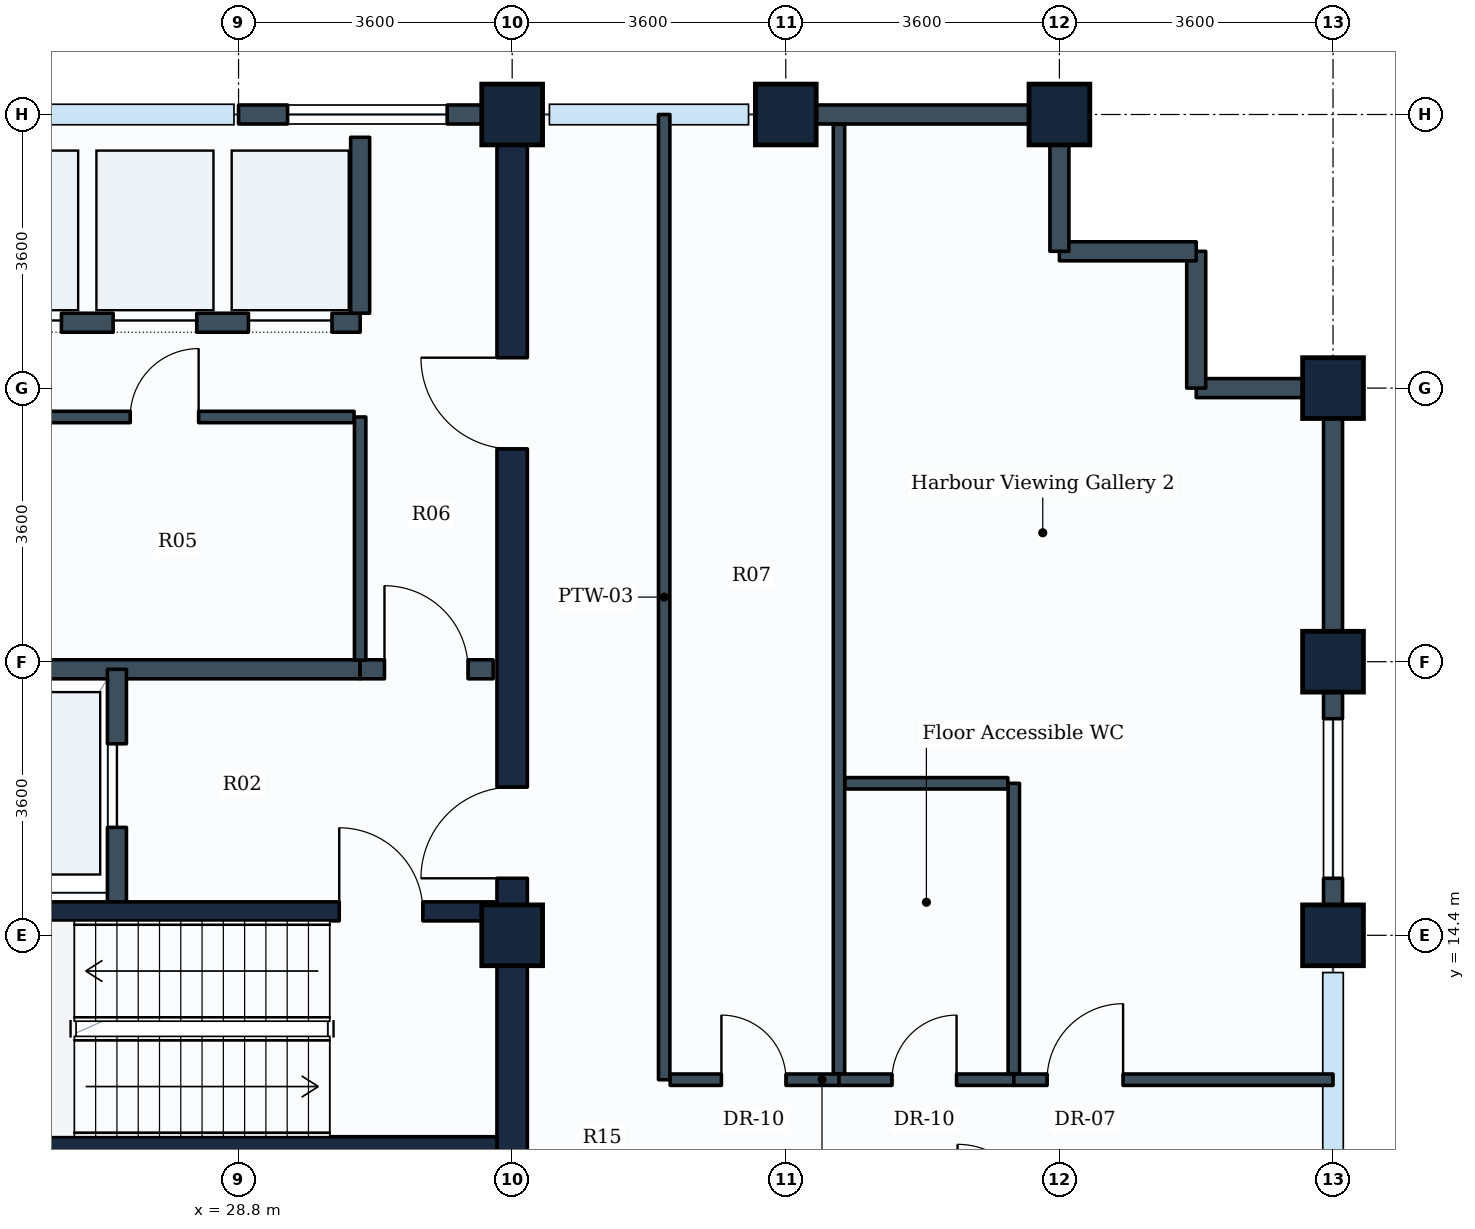
"""IFC4 building model, lengths in metres.
Left out: names, types, materials, properties, quantities, classifications, styles, units other than length and angle.
Written with IfcOpenShell. Run it as: python <this file> out.ifc"""

import sys

from ifc_helpers import new_model, si_unit, direction, frame, frame_2d, origin, origin_2d, place, context, subcontext, project, spatial, rectangle, extrude, element, fill, save


model = new_model("IFC4")
c1 = context("Model", 3, precision=1e-05, world=origin(), true_north=direction((0.0, 1.0)))
c2 = subcontext(c1, "Body", "Model", "MODEL_VIEW")
j1 = project(units=[si_unit("LENGTHUNIT", "METRE"), si_unit("PLANEANGLEUNIT", "RADIAN")], contexts=[c1])
p1 = place(None, origin())
s1 = spatial("IfcSite", under=j1, at=p1, CompositionType="ELEMENT")
p2 = place(p1, origin())
s2 = spatial("IfcBuilding", under=s1, at=p2, CompositionType="ELEMENT")
p3 = place(p2, frame((0.0, 0.0, 299.8)))
s3 = spatial("IfcBuildingStorey", under=s2, at=p3, CompositionType="ELEMENT", Elevation=299.8)
for number, where, z_axis, x_axis in (
    (1, (32.4, 14.4, 0.0), (0.0, 0.0, 1.0), (1.0, 0.0, 0.0)),
    (2, (32.4, 25.2, 0.0), (0.0, 0.0, 1.0), (1.0, 0.0, 0.0)),
    (3, (36.0, 25.2, 0.0), (0.0, 0.0, 1.0), (1.0, 0.0, 0.0)),
    (4, (39.6, 25.2, 0.0), (0.0, 0.0, 1.0), (1.0, 0.0, 0.0)),
    (5, (43.2, 14.4, 0.0), (0.0, 0.0, 1.0), (0.0, 1.0, 0.0)),
    (6, (43.2, 18.0, 0.0), (0.0, 0.0, 1.0), (0.0, 1.0, 0.0)),
    (7, (43.2, 21.6, 0.0), (0.0, 0.0, 1.0), (0.0, 1.0, 0.0)),
):
    element("IfcColumn", number, at=place(p3, frame(where, z_axis=z_axis, x_axis=x_axis)), inside=s3, PredefinedType="COLUMN", context=c2, shape_type="SweptSolid", body=[
        extrude(rectangle(XDim=0.8, YDim=0.8, at=origin_2d()), origin(), (0.0, 0.0, 1.0), 4.4),
    ])
p4 = place(p3, frame((43.2, 18.0, 0.0), z_axis=(0.0, 0.0, 1.0), x_axis=(0.0, -1.0, 0.0)))
e8 = element("IfcWall", 8, at=p4, inside=s3, PredefinedType="STANDARD", context=c2, shape_type="SweptSolid", body=[
    extrude(rectangle(XDim=3.6, YDim=0.25, at=frame_2d((1.8, 0.0))), origin(), (0.0, 0.0, 1.0), 2.58),
])
p5 = place(p4, frame((0.75, 0.0, 0.85)))
e9 = element("IfcOpeningElement", 9, at=p5, cuts=e8, PredefinedType="OPENING", context=c2, shape_type="SweptSolid", body=[
    extrude(rectangle(XDim=2.1, YDim=1.35, at=frame_2d((1.05, 0.675))), frame((0.0, 0.135, 0.0), z_axis=(0.0, -1.0, 0.0), x_axis=(1.0, 0.0, 0.0)), (0.0, 0.0, 1.0), 0.27),
])
p6 = place(p3, frame((43.2, 21.6, 0.0), z_axis=(0.0, 0.0, 1.0), x_axis=(0.0, -1.0, 0.0)))
e10 = element("IfcWall", 10, at=p6, inside=s3, PredefinedType="STANDARD", context=c2, shape_type="SweptSolid", body=[
    extrude(rectangle(XDim=3.6, YDim=0.25, at=frame_2d((1.8, 0.0))), origin(), (0.0, 0.0, 1.0), 2.58),
])
p7 = place(p3, frame((41.4, 21.6, 0.0), z_axis=(0.0, 0.0, 1.0), x_axis=(1.0, 0.0, 0.0)))
e11 = element("IfcWall", 11, at=p7, inside=s3, PredefinedType="STANDARD", context=c2, shape_type="SweptSolid", body=[
    extrude(rectangle(XDim=1.8, YDim=0.25, at=frame_2d((0.9, 0.0))), origin(), (0.0, 0.0, 1.0), 2.58),
])
for number, where, z_axis, x_axis in (
    (12, (41.4, 23.4, 0.0), (0.0, 0.0, 1.0), (0.0, -1.0, 0.0)),
    (13, (39.6, 23.4, 0.0), (0.0, 0.0, 1.0), (1.0, 0.0, 0.0)),
):
    element("IfcWall", number, at=place(p3, frame(where, z_axis=z_axis, x_axis=x_axis)), inside=s3, PredefinedType="STANDARD", context=c2, shape_type="SweptSolid", body=[
        extrude(rectangle(XDim=1.8, YDim=0.25, at=frame_2d((0.9, 0.0))), origin(), (0.0, 0.0, 1.0), 2.58),
    ])
p8 = place(p3, frame((39.6, 25.2, 0.0), z_axis=(0.0, 0.0, 1.0), x_axis=(0.0, -1.0, 0.0)))
e14 = element("IfcWall", 14, at=p8, inside=s3, PredefinedType="STANDARD", context=c2, shape_type="SweptSolid", body=[
    extrude(rectangle(XDim=1.8, YDim=0.25, at=frame_2d((0.9, 0.0))), origin(), (0.0, 0.0, 1.0), 2.58),
])
p9 = place(p3, frame((36.0, 25.2, 0.0), z_axis=(0.0, 0.0, 1.0), x_axis=(1.0, 0.0, 0.0)))
e15 = element("IfcWall", 15, at=p9, inside=s3, PredefinedType="STANDARD", context=c2, shape_type="SweptSolid", body=[
    extrude(rectangle(XDim=3.6, YDim=0.25, at=frame_2d((1.8, 0.0))), origin(), (0.0, 0.0, 1.0), 2.58),
])
p10 = place(p3, frame((28.8, 25.2, 0.0), z_axis=(0.0, 0.0, 1.0), x_axis=(1.0, 0.0, 0.0)))
e16 = element("IfcWall", 16, at=p10, inside=s3, PredefinedType="STANDARD", context=c2, shape_type="SweptSolid", body=[
    extrude(rectangle(XDim=3.6, YDim=0.25, at=frame_2d((1.8, 0.0))), origin(), (0.0, 0.0, 1.0), 4.135),
])
p11 = place(p10, frame((0.645, 0.0, 0.85)))
e17 = element("IfcOpeningElement", 17, at=p11, cuts=e16, PredefinedType="OPENING", context=c2, shape_type="SweptSolid", body=[
    extrude(rectangle(XDim=2.1, YDim=1.35, at=frame_2d((1.05, 0.675))), frame((0.0, 0.135, 0.0), z_axis=(0.0, -1.0, 0.0), x_axis=(1.0, 0.0, 0.0)), (0.0, 0.0, 1.0), 0.27),
])
p12 = place(p3, frame((32.4, 10.8, 0.0), z_axis=(0.0, 0.0, 1.0), x_axis=(0.0, 1.0, 0.0)))
e18 = element("IfcWall", 18, at=p12, inside=s3, PredefinedType="SHEAR", context=c2, shape_type="SweptSolid", body=[
    extrude(rectangle(XDim=14.4, YDim=0.4, at=frame_2d((7.2, 0.0))), origin(), (0.0, 0.0, 1.0), 4.15),
])
p13 = place(p12, frame((4.35, 0.0, 0.0)))
e19 = element("IfcOpeningElement", 19, at=p13, cuts=e18, PredefinedType="OPENING", context=c2, shape_type="SweptSolid", body=[
    extrude(rectangle(XDim=1.2, YDim=2.1, at=frame_2d((0.6, 1.05))), frame((0.0, 0.21, 0.0), z_axis=(0.0, -1.0, 0.0), x_axis=(1.0, 0.0, 0.0)), (0.0, 0.0, 1.0), 0.42),
])
p14 = place(p12, frame((10.0, 0.0, 0.0)))
e20 = element("IfcOpeningElement", 20, at=p14, cuts=e18, PredefinedType="OPENING", context=c2, shape_type="SweptSolid", body=[
    extrude(rectangle(XDim=1.2, YDim=2.1, at=frame_2d((0.6, 1.05))), frame((0.0, 0.21, 0.0), z_axis=(0.0, -1.0, 0.0), x_axis=(1.0, 0.0, 0.0)), (0.0, 0.0, 1.0), 0.42),
])
p15 = place(p3, frame((23.35, 11.625, 0.0), z_axis=(0.0, 0.0, 1.0), x_axis=(1.0, 0.0, 0.0)))
e21 = element("IfcWall", 21, at=p15, inside=s3, PredefinedType="SHEAR", context=c2, shape_type="SweptSolid", body=[
    extrude(rectangle(XDim=8.85, YDim=0.25, at=frame_2d((4.425, 0.0))), origin(), (0.0, 0.0, 1.0), 4.15),
])
p16 = place(p3, frame((23.35, 14.715, 0.0), z_axis=(0.0, 0.0, 1.0), x_axis=(1.0, 0.0, 0.0)))
e22 = element("IfcWall", 22, at=p16, inside=s3, PredefinedType="SHEAR", context=c2, shape_type="SweptSolid", body=[
    extrude(rectangle(XDim=8.85, YDim=0.25, at=frame_2d((4.425, 0.0))), origin(), (0.0, 0.0, 1.0), 4.15),
])
p17 = place(p16, frame((6.775, 0.0, 0.0)))
e23 = element("IfcOpeningElement", 23, at=p17, cuts=e22, PredefinedType="OPENING", context=c2, shape_type="SweptSolid", body=[
    extrude(rectangle(XDim=1.1, YDim=2.1, at=frame_2d((0.55, 1.05))), frame((0.0, 0.135, 0.0), z_axis=(0.0, -1.0, 0.0), x_axis=(1.0, 0.0, 0.0)), (0.0, 0.0, 1.0), 0.27),
])
p18 = place(p3, frame((21.88, 17.9, 0.0), z_axis=(0.0, 0.0, 1.0), x_axis=(1.0, 0.0, 0.0)))
e24 = element("IfcWall", 24, at=p18, inside=s3, PredefinedType="PARTITIONING", context=c2, shape_type="SweptSolid", body=[
    extrude(rectangle(XDim=8.52, YDim=0.25, at=frame_2d((4.26, 0.0))), origin(), (0.0, 0.0, 1.0), 4.135),
])
p19 = place(p3, frame((30.4, 17.9, 0.0), z_axis=(0.0, 0.0, 1.0), x_axis=(1.0, 0.0, 0.0)))
e25 = element("IfcWall", 25, at=p19, inside=s3, PredefinedType="PARTITIONING", context=c2, shape_type="SweptSolid", body=[
    extrude(rectangle(XDim=1.75, YDim=0.25, at=frame_2d((0.875, 0.0))), origin(), (0.0, 0.0, 1.0), 4.135),
])
p20 = place(p19, frame((0.32, 0.0, 0.0)))
e26 = element("IfcOpeningElement", 26, at=p20, cuts=e25, PredefinedType="OPENING", context=c2, shape_type="SweptSolid", body=[
    extrude(rectangle(XDim=1.1, YDim=2.1, at=frame_2d((0.55, 1.05))), frame((0.0, 0.135, 0.0), z_axis=(0.0, -1.0, 0.0), x_axis=(1.0, 0.0, 0.0)), (0.0, 0.0, 1.0), 0.27),
])
p21 = place(p3, frame((27.2, 14.84, 0.0), z_axis=(0.0, 0.0, 1.0), x_axis=(0.0, 1.0, 0.0)))
e27 = element("IfcWall", 27, at=p21, inside=s3, PredefinedType="PARTITIONING", context=c2, shape_type="SweptSolid", body=[
    extrude(rectangle(XDim=3.06, YDim=0.25, at=frame_2d((1.53, 0.0))), origin(), (0.0, 0.0, 1.0), 4.135),
])
p22 = place(p21, frame((0.98, 0.0, 0.0)))
e28 = element("IfcOpeningElement", 28, at=p22, cuts=e27, PredefinedType="OPENING", context=c2, shape_type="SweptSolid", body=[
    extrude(rectangle(XDim=1.1, YDim=2.1, at=frame_2d((0.55, 1.05))), frame((0.0, 0.135, 0.0), z_axis=(0.0, -1.0, 0.0), x_axis=(1.0, 0.0, 0.0)), (0.0, 0.0, 1.0), 0.27),
])
p23 = place(p3, frame((23.18, 22.46, 0.0), z_axis=(0.0, 0.0, 1.0), x_axis=(1.0, 0.0, 0.0)))
e29 = element("IfcWall", 29, at=p23, inside=s3, PredefinedType="PARTITIONING", context=c2, shape_type="SweptSolid", body=[
    extrude(rectangle(XDim=7.22, YDim=0.25, at=frame_2d((3.61, 0.0))), origin(), (0.0, 0.0, 1.0), 4.135),
])
p24 = place(p23, frame((0.41, 0.0, 0.0)))
e30 = element("IfcOpeningElement", 30, at=p24, cuts=e29, PredefinedType="OPENING", context=c2, shape_type="SweptSolid", body=[
    extrude(rectangle(XDim=1.1, YDim=2.1, at=frame_2d((0.55, 1.05))), frame((0.0, 0.135, 0.0), z_axis=(0.0, -1.0, 0.0), x_axis=(1.0, 0.0, 0.0)), (0.0, 0.0, 1.0), 0.27),
])
p25 = place(p23, frame((2.19, 0.0, 0.0)))
e31 = element("IfcOpeningElement", 31, at=p25, cuts=e29, PredefinedType="OPENING", context=c2, shape_type="SweptSolid", body=[
    extrude(rectangle(XDim=1.1, YDim=2.1, at=frame_2d((0.55, 1.05))), frame((0.0, 0.135, 0.0), z_axis=(0.0, -1.0, 0.0), x_axis=(1.0, 0.0, 0.0)), (0.0, 0.0, 1.0), 0.27),
])
p26 = place(p23, frame((3.97, 0.0, 0.0)))
e32 = element("IfcOpeningElement", 32, at=p26, cuts=e29, PredefinedType="OPENING", context=c2, shape_type="SweptSolid", body=[
    extrude(rectangle(XDim=1.1, YDim=2.1, at=frame_2d((0.55, 1.05))), frame((0.0, 0.135, 0.0), z_axis=(0.0, -1.0, 0.0), x_axis=(1.0, 0.0, 0.0)), (0.0, 0.0, 1.0), 0.27),
])
p27 = place(p23, frame((5.75, 0.0, 0.0)))
e33 = element("IfcOpeningElement", 33, at=p27, cuts=e29, PredefinedType="OPENING", context=c2, shape_type="SweptSolid", body=[
    extrude(rectangle(XDim=1.1, YDim=2.1, at=frame_2d((0.55, 1.05))), frame((0.0, 0.135, 0.0), z_axis=(0.0, -1.0, 0.0), x_axis=(1.0, 0.0, 0.0)), (0.0, 0.0, 1.0), 0.27),
])
p28 = place(p3, frame((30.4, 22.585, 0.0), z_axis=(0.0, 0.0, 1.0), x_axis=(0.0, 1.0, 0.0)))
e34 = element("IfcWall", 34, at=p28, inside=s3, PredefinedType="PARTITIONING", context=c2, shape_type="SweptSolid", body=[
    extrude(rectangle(XDim=2.315, YDim=0.25, at=frame_2d((1.157, 0.0))), origin(), (0.0, 0.0, 1.0), 4.135),
])
p29 = place(p3, frame((22.775, 21.22, 0.0), z_axis=(0.0, 0.0, 1.0), x_axis=(1.0, 0.0, 0.0)))
e35 = element("IfcWall", 35, at=p29, inside=s3, PredefinedType="PARTITIONING", context=c2, shape_type="SweptSolid", body=[
    extrude(rectangle(XDim=7.545, YDim=0.15, at=frame_2d((3.772, 0.0))), origin(), (0.0, 0.0, 1.0), 4.135),
])
p30 = place(p29, frame((0.95, 0.0, 0.0)))
e36 = element("IfcOpeningElement", 36, at=p30, cuts=e35, PredefinedType="OPENING", context=c2, shape_type="SweptSolid", body=[
    extrude(rectangle(XDim=0.85, YDim=2.1, at=frame_2d((0.425, 1.05))), frame((0.0, 0.085, 0.0), z_axis=(0.0, -1.0, 0.0), x_axis=(1.0, 0.0, 0.0)), (0.0, 0.0, 1.0), 0.17),
])
p31 = place(p29, frame((4.6, 0.0, 0.0)))
e37 = element("IfcOpeningElement", 37, at=p31, cuts=e35, PredefinedType="OPENING", context=c2, shape_type="SweptSolid", body=[
    extrude(rectangle(XDim=0.9, YDim=2.1, at=frame_2d((0.45, 1.05))), frame((0.0, 0.085, 0.0), z_axis=(0.0, -1.0, 0.0), x_axis=(1.0, 0.0, 0.0)), (0.0, 0.0, 1.0), 0.17),
])
p32 = place(p3, frame((30.4, 18.02, 0.0), z_axis=(0.0, 0.0, 1.0), x_axis=(0.0, 1.0, 0.0)))
e38 = element("IfcWall", 38, at=p32, inside=s3, PredefinedType="PARTITIONING", context=c2, shape_type="SweptSolid", body=[
    extrude(rectangle(XDim=3.2, YDim=0.15, at=frame_2d((1.6, 0.0))), origin(), (0.0, 0.0, 1.0), 4.135),
])
p33 = place(p3, frame((34.4, 12.5, 0.0), z_axis=(0.0, 0.0, 1.0), x_axis=(0.0, 1.0, 0.0)))
e39 = element("IfcWall", 39, at=p33, inside=s3, PredefinedType="PARTITIONING", context=c2, shape_type="SweptSolid", body=[
    extrude(rectangle(XDim=12.7, YDim=0.15, at=frame_2d((6.35, 0.0))), origin(), (0.0, 0.0, 1.0), 2.58),
])
p34 = place(p3, frame((34.479, 12.5, 0.0), z_axis=(0.0, 0.0, 1.0), x_axis=(1.0, 0.0, 0.0)))
e40 = element("IfcWall", 40, at=p34, inside=s3, PredefinedType="PARTITIONING", context=c2, shape_type="SweptSolid", body=[
    extrude(rectangle(XDim=2.221, YDim=0.15, at=frame_2d((1.11, 0.0))), origin(), (0.0, 0.0, 1.0), 4.135),
])
p35 = place(p34, frame((0.674, 0.0, 0.0)))
e41 = element("IfcOpeningElement", 41, at=p35, cuts=e40, PredefinedType="OPENING", context=c2, shape_type="SweptSolid", body=[
    extrude(rectangle(XDim=0.85, YDim=2.1, at=frame_2d((0.425, 1.05))), frame((0.0, 0.085, 0.0), z_axis=(0.0, -1.0, 0.0), x_axis=(1.0, 0.0, 0.0)), (0.0, 0.0, 1.0), 0.17),
])
p36 = place(p3, frame((36.7, 12.579, 0.0), z_axis=(0.0, 0.0, 1.0), x_axis=(0.0, 1.0, 0.0)))
e42 = element("IfcWall", 42, at=p36, inside=s3, PredefinedType="PARTITIONING", context=c2, shape_type="SweptSolid", body=[
    extrude(rectangle(XDim=12.492, YDim=0.15, at=frame_2d((6.246, 0.0))), origin(), (0.0, 0.0, 1.0), 2.58),
])
p37 = place(p3, frame((36.7, 12.5, 0.0), z_axis=(0.0, 0.0, 1.0), x_axis=(1.0, 0.0, 0.0)))
e43 = element("IfcWall", 43, at=p37, inside=s3, PredefinedType="PARTITIONING", context=c2, shape_type="SweptSolid", body=[
    extrude(rectangle(XDim=2.3, YDim=0.15, at=frame_2d((1.15, 0.0))), origin(), (0.0, 0.0, 1.0), 4.135),
])
p38 = place(p37, frame((0.697, 0.0, 0.0)))
e44 = element("IfcOpeningElement", 44, at=p38, cuts=e43, PredefinedType="OPENING", context=c2, shape_type="SweptSolid", body=[
    extrude(rectangle(XDim=0.85, YDim=2.1, at=frame_2d((0.425, 1.05))), frame((0.0, 0.085, 0.0), z_axis=(0.0, -1.0, 0.0), x_axis=(1.0, 0.0, 0.0)), (0.0, 0.0, 1.0), 0.17),
])
p39 = place(p3, frame((39.0, 12.579, 0.0), z_axis=(0.0, 0.0, 1.0), x_axis=(0.0, 1.0, 0.0)))
e45 = element("IfcWall", 45, at=p39, inside=s3, PredefinedType="PARTITIONING", context=c2, shape_type="SweptSolid", body=[
    extrude(rectangle(XDim=3.821, YDim=0.15, at=frame_2d((1.91, 0.0))), origin(), (0.0, 0.0, 1.0), 2.58),
])
p40 = place(p3, frame((36.779, 16.4, 0.0), z_axis=(0.0, 0.0, 1.0), x_axis=(1.0, 0.0, 0.0)))
e46 = element("IfcWall", 46, at=p40, inside=s3, PredefinedType="PARTITIONING", context=c2, shape_type="SweptSolid", body=[
    extrude(rectangle(XDim=2.142, YDim=0.15, at=frame_2d((1.071, 0.0))), origin(), (0.0, 0.0, 1.0), 4.135),
])
p41 = place(p3, frame((39.0, 12.5, 0.0), z_axis=(0.0, 0.0, 1.0), x_axis=(1.0, 0.0, 0.0)))
e47 = element("IfcWall", 47, at=p41, inside=s3, PredefinedType="PARTITIONING", context=c2, shape_type="SweptSolid", body=[
    extrude(rectangle(XDim=4.2, YDim=0.15, at=frame_2d((2.1, 0.0))), origin(), (0.0, 0.0, 1.0), 2.58),
])
p42 = place(p41, frame((0.438, 0.0, 0.0)))
e48 = element("IfcOpeningElement", 48, at=p42, cuts=e47, PredefinedType="OPENING", context=c2, shape_type="SweptSolid", body=[
    extrude(rectangle(XDim=1.0, YDim=2.1, at=frame_2d((0.5, 1.05))), frame((0.0, 0.085, 0.0), z_axis=(0.0, -1.0, 0.0), x_axis=(1.0, 0.0, 0.0)), (0.0, 0.0, 1.0), 0.17),
])
p43 = place(p5, origin())
e49 = element("IfcWindow", 49, at=p43, inside=s3, PartitioningType="SINGLE_PANEL", PredefinedType="WINDOW", context=c2, shape_type="SweptSolid", body=[
    extrude(rectangle(XDim=2.1, YDim=1.35, at=frame_2d((1.05, 0.675))), frame((0.0, 0.03, 0.0), z_axis=(0.0, -1.0, 0.0), x_axis=(1.0, 0.0, 0.0)), (0.0, 0.0, 1.0), 0.06),
])
fill(e9, e49)
p44 = place(p11, origin())
e50 = element("IfcWindow", 50, at=p44, inside=s3, PartitioningType="SINGLE_PANEL", PredefinedType="WINDOW", context=c2, shape_type="SweptSolid", body=[
    extrude(rectangle(XDim=2.1, YDim=1.35, at=frame_2d((1.05, 0.675))), frame((0.0, 0.03, 0.0), z_axis=(0.0, -1.0, 0.0), x_axis=(1.0, 0.0, 0.0)), (0.0, 0.0, 1.0), 0.06),
])
fill(e17, e50)
p45 = place(p17, origin())
e51 = element("IfcDoor", 51, at=p45, inside=s3, OperationType="SINGLE_SWING_LEFT", PredefinedType="DOOR", context=c2, shape_type="SweptSolid", body=[
    extrude(rectangle(XDim=1.1, YDim=2.1, at=frame_2d((0.55, 1.05))), frame((0.0, 0.025, 0.0), z_axis=(0.0, -1.0, 0.0), x_axis=(1.0, 0.0, 0.0)), (0.0, 0.0, 1.0), 0.05),
])
fill(e23, e51)
p46 = place(p22, origin())
e52 = element("IfcDoor", 52, at=p46, inside=s3, OperationType="SLIDING_TO_LEFT", PredefinedType="DOOR", context=c2, shape_type="SweptSolid", body=[
    extrude(rectangle(XDim=1.1, YDim=2.1, at=frame_2d((0.55, 1.05))), frame((0.0, 0.025, 0.0), z_axis=(0.0, -1.0, 0.0), x_axis=(1.0, 0.0, 0.0)), (0.0, 0.0, 1.0), 0.05),
])
fill(e28, e52)
p47 = place(p13, origin())
e53 = element("IfcDoor", 53, at=p47, inside=s3, OperationType="SINGLE_SWING_LEFT", PredefinedType="DOOR", context=c2, shape_type="SweptSolid", body=[
    extrude(rectangle(XDim=1.2, YDim=2.1, at=frame_2d((0.6, 1.05))), frame((0.0, 0.025, 0.0), z_axis=(0.0, -1.0, 0.0), x_axis=(1.0, 0.0, 0.0)), (0.0, 0.0, 1.0), 0.05),
])
fill(e19, e53)
p48 = place(p20, origin())
e54 = element("IfcDoor", 54, at=p48, inside=s3, OperationType="SINGLE_SWING_LEFT", PredefinedType="DOOR", context=c2, shape_type="SweptSolid", body=[
    extrude(rectangle(XDim=1.1, YDim=2.1, at=frame_2d((0.55, 1.05))), frame((0.0, 0.025, 0.0), z_axis=(0.0, -1.0, 0.0), x_axis=(1.0, 0.0, 0.0)), (0.0, 0.0, 1.0), 0.05),
])
fill(e26, e54)
p49 = place(p25, origin())
e55 = element("IfcDoor", 55, at=p49, inside=s3, OperationType="SLIDING_TO_LEFT", PredefinedType="DOOR", context=c2, shape_type="SweptSolid", body=[
    extrude(rectangle(XDim=1.1, YDim=2.1, at=frame_2d((0.55, 1.05))), frame((0.0, 0.025, 0.0), z_axis=(0.0, -1.0, 0.0), x_axis=(1.0, 0.0, 0.0)), (0.0, 0.0, 1.0), 0.05),
])
fill(e31, e55)
p50 = place(p26, origin())
e56 = element("IfcDoor", 56, at=p50, inside=s3, OperationType="SLIDING_TO_LEFT", PredefinedType="DOOR", context=c2, shape_type="SweptSolid", body=[
    extrude(rectangle(XDim=1.1, YDim=2.1, at=frame_2d((0.55, 1.05))), frame((0.0, 0.025, 0.0), z_axis=(0.0, -1.0, 0.0), x_axis=(1.0, 0.0, 0.0)), (0.0, 0.0, 1.0), 0.05),
])
fill(e32, e56)
p51 = place(p27, origin())
e57 = element("IfcDoor", 57, at=p51, inside=s3, OperationType="SLIDING_TO_LEFT", PredefinedType="DOOR", context=c2, shape_type="SweptSolid", body=[
    extrude(rectangle(XDim=1.1, YDim=2.1, at=frame_2d((0.55, 1.05))), frame((0.0, 0.025, 0.0), z_axis=(0.0, -1.0, 0.0), x_axis=(1.0, 0.0, 0.0)), (0.0, 0.0, 1.0), 0.05),
])
fill(e33, e57)
p52 = place(p14, origin())
e58 = element("IfcDoor", 58, at=p52, inside=s3, OperationType="SINGLE_SWING_RIGHT", PredefinedType="DOOR", context=c2, shape_type="SweptSolid", body=[
    extrude(rectangle(XDim=1.2, YDim=2.1, at=frame_2d((0.6, 1.05))), frame((0.0, 0.025, 0.0), z_axis=(0.0, -1.0, 0.0), x_axis=(1.0, 0.0, 0.0)), (0.0, 0.0, 1.0), 0.05),
])
fill(e20, e58)
p53 = place(p31, origin())
e59 = element("IfcDoor", 59, at=p53, inside=s3, OperationType="SINGLE_SWING_RIGHT", PredefinedType="DOOR", context=c2, shape_type="SweptSolid", body=[
    extrude(rectangle(XDim=0.9, YDim=2.1, at=frame_2d((0.45, 1.05))), frame((0.0, 0.025, 0.0), z_axis=(0.0, -1.0, 0.0), x_axis=(1.0, 0.0, 0.0)), (0.0, 0.0, 1.0), 0.05),
])
fill(e37, e59)
p54 = place(p35, origin())
e60 = element("IfcDoor", 60, at=p54, inside=s3, OperationType="SINGLE_SWING_LEFT", PredefinedType="DOOR", context=c2, shape_type="SweptSolid", body=[
    extrude(rectangle(XDim=0.85, YDim=2.1, at=frame_2d((0.425, 1.05))), frame((0.0, 0.025, 0.0), z_axis=(0.0, -1.0, 0.0), x_axis=(1.0, 0.0, 0.0)), (0.0, 0.0, 1.0), 0.05),
])
fill(e41, e60)
p55 = place(p38, origin())
e61 = element("IfcDoor", 61, at=p55, inside=s3, OperationType="SINGLE_SWING_RIGHT", PredefinedType="DOOR", context=c2, shape_type="SweptSolid", body=[
    extrude(rectangle(XDim=0.85, YDim=2.1, at=frame_2d((0.425, 1.05))), frame((0.0, 0.025, 0.0), z_axis=(0.0, -1.0, 0.0), x_axis=(1.0, 0.0, 0.0)), (0.0, 0.0, 1.0), 0.05),
])
fill(e44, e61)
p56 = place(p42, origin())
e62 = element("IfcDoor", 62, at=p56, inside=s3, OperationType="SINGLE_SWING_RIGHT", PredefinedType="DOOR", context=c2, shape_type="SweptSolid", body=[
    extrude(rectangle(XDim=1.0, YDim=2.1, at=frame_2d((0.5, 1.05))), frame((0.0, 0.025, 0.0), z_axis=(0.0, -1.0, 0.0), x_axis=(1.0, 0.0, 0.0)), (0.0, 0.0, 1.0), 0.05),
])
fill(e48, e62)
save(model, sys.argv[1])
